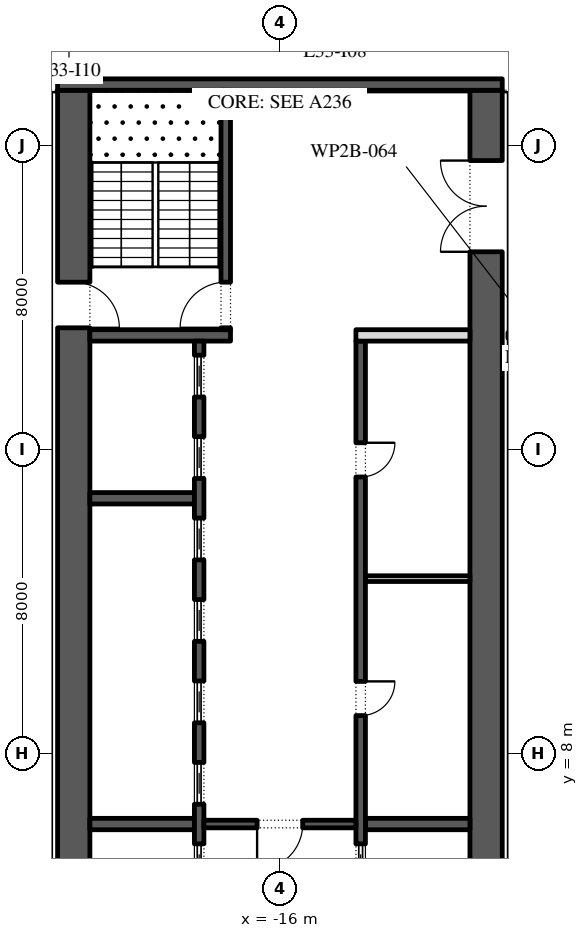
"""IFC4 building model, lengths in metres.
Left out: names, types, materials, properties, quantities, classifications, styles, units other than length and angle.
Written with IfcOpenShell. Run it as: python <this file> out.ifc"""

import sys

from ifc_helpers import new_model, si_unit, direction, frame, frame_2d, origin, place, context, subcontext, project, spatial, rectangle, extrude, element, fill, save


model = new_model("IFC4")
c1 = context("Model", 3, precision=1e-05, world=origin(), true_north=direction((0.0, 1.0)))
c2 = subcontext(c1, "Body", "Model", "MODEL_VIEW")
j1 = project(units=[si_unit("LENGTHUNIT", "METRE"), si_unit("PLANEANGLEUNIT", "RADIAN")], contexts=[c1])
p1 = place(None, origin())
s1 = spatial("IfcSite", under=j1, at=p1, CompositionType="ELEMENT")
p2 = place(p1, origin())
s2 = spatial("IfcBuilding", under=s1, at=p2, CompositionType="ELEMENT")
p3 = place(p2, frame((0.0, 0.0, 151.8)))
s3 = spatial("IfcBuildingStorey", under=s2, at=p3, CompositionType="ELEMENT", Elevation=151.8)
p4 = place(p3, frame((-21.425, -2.45, 0.0), z_axis=(0.0, 0.0, 1.0), x_axis=(0.0, 1.0, 0.0)))
e1 = element("IfcWall", 1, at=p4, inside=s3, PredefinedType="SHEAR", context=c2, shape_type="SweptSolid", body=[
    extrude(rectangle(XDim=27.9, YDim=0.85, at=frame_2d((13.95, 0.0))), origin(), (0.0, 0.0, 1.0), 3.95),
])
p5 = place(p4, frame((5.05, 0.0, 0.0)))
e2 = element("IfcOpeningElement", 2, at=p5, cuts=e1, PredefinedType="OPENING", context=c2, shape_type="SweptSolid", body=[
    extrude(rectangle(XDim=1.2, YDim=2.1, at=frame_2d((0.6, 1.05))), frame((0.0, 0.435, 0.0), z_axis=(0.0, -1.0, 0.0), x_axis=(1.0, 0.0, 0.0)), (0.0, 0.0, 1.0), 0.87),
])
p6 = place(p4, frame((21.65, 0.0, 0.0)))
e3 = element("IfcOpeningElement", 3, at=p6, cuts=e1, PredefinedType="OPENING", context=c2, shape_type="SweptSolid", body=[
    extrude(rectangle(XDim=1.2, YDim=2.1, at=frame_2d((0.6, 1.05))), frame((0.0, 0.435, 0.0), z_axis=(0.0, -1.0, 0.0), x_axis=(1.0, 0.0, 0.0)), (0.0, 0.0, 1.0), 0.87),
])
p7 = place(p3, frame((-10.575, -2.45, 0.0), z_axis=(0.0, 0.0, 1.0), x_axis=(0.0, 1.0, 0.0)))
e4 = element("IfcWall", 4, at=p7, inside=s3, PredefinedType="SHEAR", context=c2, shape_type="SweptSolid", body=[
    extrude(rectangle(XDim=27.9, YDim=0.85, at=frame_2d((13.95, 0.0))), origin(), (0.0, 0.0, 1.0), 3.95),
])
p8 = place(p7, frame((23.65, 0.0, 0.0)))
e5 = element("IfcOpeningElement", 5, at=p8, cuts=e4, PredefinedType="OPENING", context=c2, shape_type="SweptSolid", body=[
    extrude(rectangle(XDim=2.4, YDim=2.1, at=frame_2d((1.2, 1.05))), frame((0.0, 0.435, 0.0), z_axis=(0.0, -1.0, 0.0), x_axis=(1.0, 0.0, 0.0)), (0.0, 0.0, 1.0), 0.87),
])
p9 = place(p7, frame((1.387, 0.0, 0.0)))
e6 = element("IfcOpeningElement", 6, at=p9, cuts=e4, PredefinedType="OPENING", context=c2, shape_type="SweptSolid", body=[
    extrude(rectangle(XDim=0.9, YDim=2.1, at=frame_2d((0.45, 1.05))), frame((0.0, 0.435, 0.0), z_axis=(0.0, -1.0, 0.0), x_axis=(1.0, 0.0, 0.0)), (0.0, 0.0, 1.0), 0.87),
])
p10 = place(p7, frame((4.562, 0.0, 0.0)))
e7 = element("IfcOpeningElement", 7, at=p10, cuts=e4, PredefinedType="OPENING", context=c2, shape_type="SweptSolid", body=[
    extrude(rectangle(XDim=1.0, YDim=2.1, at=frame_2d((0.5, 1.05))), frame((0.0, 0.435, 0.0), z_axis=(0.0, -1.0, 0.0), x_axis=(1.0, 0.0, 0.0)), (0.0, 0.0, 1.0), 0.87),
])
p11 = place(p3, frame((-21.85, 25.6, 0.0), z_axis=(0.0, 0.0, 1.0), x_axis=(1.0, 0.0, 0.0)))
e8 = element("IfcWall", 8, at=p11, inside=s3, PredefinedType="SHEAR", context=c2, shape_type="SweptSolid", body=[
    extrude(rectangle(XDim=11.7, YDim=0.3, at=frame_2d((5.85, 0.0))), origin(), (0.0, 0.0, 1.0), 3.95),
])
p12 = place(p3, frame((-21.0, 19.0, 0.0), z_axis=(0.0, 0.0, 1.0), x_axis=(1.0, 0.0, 0.0)))
e9 = element("IfcWall", 9, at=p12, inside=s3, PredefinedType="SHEAR", context=c2, shape_type="SweptSolid", body=[
    extrude(rectangle(XDim=3.7, YDim=0.3, at=frame_2d((1.85, 0.0))), origin(), (0.0, 0.0, 1.0), 3.95),
])
p13 = place(p3, frame((-17.425, 19.15, 0.0), z_axis=(0.0, 0.0, 1.0), x_axis=(0.0, 1.0, 0.0)))
e10 = element("IfcWall", 10, at=p13, inside=s3, PredefinedType="SHEAR", context=c2, shape_type="SweptSolid", body=[
    extrude(rectangle(XDim=6.3, YDim=0.25, at=frame_2d((3.15, 0.0))), origin(), (0.0, 0.0, 1.0), 3.95),
])
p14 = place(p13, frame((0.05, 0.0, 0.0)))
e11 = element("IfcOpeningElement", 11, at=p14, cuts=e10, PredefinedType="OPENING", context=c2, shape_type="SweptSolid", body=[
    extrude(rectangle(XDim=1.2, YDim=2.1, at=frame_2d((0.6, 1.05))), frame((0.0, 0.135, 0.0), z_axis=(0.0, -1.0, 0.0), x_axis=(1.0, 0.0, 0.0)), (0.0, 0.0, 1.0), 0.27),
])
for number, where, z_axis, x_axis in (
    (12, (-21.0, 6.143, 0.0), (0.0, 0.0, 1.0), (1.0, 0.0, 0.0)),
    (13, (-21.0, 14.714, 0.0), (0.0, 0.0, 1.0), (1.0, 0.0, 0.0)),
):
    element("IfcWall", number, at=place(p3, frame(where, z_axis=z_axis, x_axis=x_axis)), inside=s3, PredefinedType="SHEAR", context=c2, shape_type="SweptSolid", body=[
        extrude(rectangle(XDim=2.75, YDim=0.3, at=frame_2d((1.375, 0.0))), origin(), (0.0, 0.0, 1.0), 3.95),
    ])
p15 = place(p3, frame((-18.125, 4.15, 0.0), z_axis=(0.0, 0.0, 1.0), x_axis=(0.0, 1.0, 0.0)))
e14 = element("IfcWall", 14, at=p15, inside=s3, PredefinedType="SHEAR", context=c2, shape_type="SweptSolid", body=[
    extrude(rectangle(XDim=14.7, YDim=0.25, at=frame_2d((7.35, 0.0))), origin(), (0.0, 0.0, 1.0), 3.95),
])
p16 = place(p15, frame((0.371, 0.0, 0.0)))
e15 = element("IfcOpeningElement", 15, at=p16, cuts=e14, PredefinedType="OPENING", context=c2, shape_type="SweptSolid", body=[
    extrude(rectangle(XDim=1.1, YDim=2.1, at=frame_2d((0.55, 1.05))), frame((0.0, 0.135, 0.0), z_axis=(0.0, -1.0, 0.0), x_axis=(1.0, 0.0, 0.0)), (0.0, 0.0, 1.0), 0.27),
])
p17 = place(p15, frame((2.514, 0.0, 0.0)))
e16 = element("IfcOpeningElement", 16, at=p17, cuts=e14, PredefinedType="OPENING", context=c2, shape_type="SweptSolid", body=[
    extrude(rectangle(XDim=1.1, YDim=2.1, at=frame_2d((0.55, 1.05))), frame((0.0, 0.135, 0.0), z_axis=(0.0, -1.0, 0.0), x_axis=(1.0, 0.0, 0.0)), (0.0, 0.0, 1.0), 0.27),
])
p18 = place(p15, frame((4.657, 0.0, 0.0)))
e17 = element("IfcOpeningElement", 17, at=p18, cuts=e14, PredefinedType="OPENING", context=c2, shape_type="SweptSolid", body=[
    extrude(rectangle(XDim=1.1, YDim=2.1, at=frame_2d((0.55, 1.05))), frame((0.0, 0.135, 0.0), z_axis=(0.0, -1.0, 0.0), x_axis=(1.0, 0.0, 0.0)), (0.0, 0.0, 1.0), 0.27),
])
p19 = place(p15, frame((6.8, 0.0, 0.0)))
e18 = element("IfcOpeningElement", 18, at=p19, cuts=e14, PredefinedType="OPENING", context=c2, shape_type="SweptSolid", body=[
    extrude(rectangle(XDim=1.1, YDim=2.1, at=frame_2d((0.55, 1.05))), frame((0.0, 0.135, 0.0), z_axis=(0.0, -1.0, 0.0), x_axis=(1.0, 0.0, 0.0)), (0.0, 0.0, 1.0), 0.27),
])
p20 = place(p15, frame((8.943, 0.0, 0.0)))
e19 = element("IfcOpeningElement", 19, at=p20, cuts=e14, PredefinedType="OPENING", context=c2, shape_type="SweptSolid", body=[
    extrude(rectangle(XDim=1.1, YDim=2.1, at=frame_2d((0.55, 1.05))), frame((0.0, 0.135, 0.0), z_axis=(0.0, -1.0, 0.0), x_axis=(1.0, 0.0, 0.0)), (0.0, 0.0, 1.0), 0.27),
])
p21 = place(p15, frame((11.086, 0.0, 0.0)))
e20 = element("IfcOpeningElement", 20, at=p21, cuts=e14, PredefinedType="OPENING", context=c2, shape_type="SweptSolid", body=[
    extrude(rectangle(XDim=1.1, YDim=2.1, at=frame_2d((0.55, 1.05))), frame((0.0, 0.135, 0.0), z_axis=(0.0, -1.0, 0.0), x_axis=(1.0, 0.0, 0.0)), (0.0, 0.0, 1.0), 0.27),
])
p22 = place(p15, frame((13.229, 0.0, 0.0)))
e21 = element("IfcOpeningElement", 21, at=p22, cuts=e14, PredefinedType="OPENING", context=c2, shape_type="SweptSolid", body=[
    extrude(rectangle(XDim=1.1, YDim=2.1, at=frame_2d((0.55, 1.05))), frame((0.0, 0.135, 0.0), z_axis=(0.0, -1.0, 0.0), x_axis=(1.0, 0.0, 0.0)), (0.0, 0.0, 1.0), 0.27),
])
p23 = place(p3, frame((-13.75, 6.143, 0.0), z_axis=(0.0, 0.0, 1.0), x_axis=(1.0, 0.0, 0.0)))
e22 = element("IfcWall", 22, at=p23, inside=s3, PredefinedType="SHEAR", context=c2, shape_type="SweptSolid", body=[
    extrude(rectangle(XDim=2.75, YDim=0.3, at=frame_2d((1.375, 0.0))), origin(), (0.0, 0.0, 1.0), 3.95),
])
p24 = place(p3, frame((-13.875, -2.45, 0.0), z_axis=(0.0, 0.0, 1.0), x_axis=(0.0, 1.0, 0.0)))
e23 = element("IfcWall", 23, at=p24, inside=s3, PredefinedType="SHEAR", context=c2, shape_type="SweptSolid", body=[
    extrude(rectangle(XDim=21.3, YDim=0.25, at=frame_2d((10.65, 0.0))), origin(), (0.0, 0.0, 1.0), 3.95),
])
p25 = place(p24, frame((11.446, 0.0, 0.0)))
e24 = element("IfcOpeningElement", 24, at=p25, cuts=e23, PredefinedType="OPENING", context=c2, shape_type="SweptSolid", body=[
    extrude(rectangle(XDim=0.9, YDim=2.1, at=frame_2d((0.45, 1.05))), frame((0.0, 0.135, 0.0), z_axis=(0.0, -1.0, 0.0), x_axis=(1.0, 0.0, 0.0)), (0.0, 0.0, 1.0), 0.27),
])
p26 = place(p24, frame((17.725, 0.0, 0.0)))
e25 = element("IfcOpeningElement", 25, at=p26, cuts=e23, PredefinedType="OPENING", context=c2, shape_type="SweptSolid", body=[
    extrude(rectangle(XDim=0.9, YDim=2.1, at=frame_2d((0.45, 1.05))), frame((0.0, 0.135, 0.0), z_axis=(0.0, -1.0, 0.0), x_axis=(1.0, 0.0, 0.0)), (0.0, 0.0, 1.0), 0.27),
])
p27 = place(p24, frame((6.971, 0.0, 0.0)))
e26 = element("IfcOpeningElement", 26, at=p27, cuts=e23, PredefinedType="OPENING", context=c2, shape_type="SweptSolid", body=[
    extrude(rectangle(XDim=1.1, YDim=2.1, at=frame_2d((0.55, 1.05))), frame((0.0, 0.135, 0.0), z_axis=(0.0, -1.0, 0.0), x_axis=(1.0, 0.0, 0.0)), (0.0, 0.0, 1.0), 0.27),
])
p28 = place(p3, frame((-14.0, 19.0, 0.0), z_axis=(0.0, 0.0, 1.0), x_axis=(1.0, 0.0, 0.0)))
e27 = element("IfcWall", 27, at=p28, inside=s3, PredefinedType="PARTITIONING", context=c2, shape_type="SweptSolid", body=[
    extrude(rectangle(XDim=3.0, YDim=0.3, at=frame_2d((1.5, 0.0))), origin(), (0.0, 0.0, 1.0), 3.95),
])
p29 = place(p3, frame((-13.75, 12.6, 0.0), z_axis=(0.0, 0.0, 1.0), x_axis=(1.0, 0.0, 0.0)))
e28 = element("IfcWall", 28, at=p29, inside=s3, PredefinedType="PARTITIONING", context=c2, shape_type="SweptSolid", body=[
    extrude(rectangle(XDim=2.75, YDim=0.15, at=frame_2d((1.375, 0.0))), origin(), (0.0, 0.0, 1.0), 3.95),
])
p30 = place(p3, frame((-18.0, 6.143, 0.0), z_axis=(0.0, 0.0, 1.0), x_axis=(1.0, 0.0, 0.0)))
e29 = element("IfcWall", 29, at=p30, inside=s3, PredefinedType="SHEAR", context=c2, shape_type="SweptSolid", body=[
    extrude(rectangle(XDim=4.0, YDim=0.2, at=frame_2d((2.0, 0.0))), origin(), (0.0, 0.0, 1.0), 3.95),
])
p31 = place(p30, frame((1.4, 0.0, 0.0)))
e30 = element("IfcOpeningElement", 30, at=p31, cuts=e29, PredefinedType="OPENING", context=c2, shape_type="SweptSolid", body=[
    extrude(rectangle(XDim=1.2, YDim=2.1, at=frame_2d((0.6, 1.05))), frame((0.0, 0.11, 0.0), z_axis=(0.0, -1.0, 0.0), x_axis=(1.0, 0.0, 0.0)), (0.0, 0.0, 1.0), 0.22),
])
p32 = place(p3, frame((-10.0, 19.0, 0.0), z_axis=(0.0, 0.0, 1.0), x_axis=(1.0, 0.0, 0.0)))
e31 = element("IfcWall", 31, at=p32, inside=s3, PredefinedType="PARTITIONING", context=c2, shape_type="SweptSolid", body=[
    extrude(rectangle(XDim=1.515, YDim=0.15, at=frame_2d((0.757, 0.0))), origin(), (0.0, 0.0, 1.0), 3.95),
])
p33 = place(p32, frame((0.258, 0.0, 0.0)))
e32 = element("IfcOpeningElement", 32, at=p33, cuts=e31, PredefinedType="OPENING", context=c2, shape_type="SweptSolid", body=[
    extrude(rectangle(XDim=1.0, YDim=2.1, at=frame_2d((0.5, 1.05))), frame((0.0, 0.085, 0.0), z_axis=(0.0, -1.0, 0.0), x_axis=(1.0, 0.0, 0.0)), (0.0, 0.0, 1.0), 0.17),
])
p34 = place(p16, origin())
e33 = element("IfcDoor", 33, at=p34, inside=s3, OperationType="SLIDING_TO_LEFT", PredefinedType="DOOR", context=c2, shape_type="SweptSolid", body=[
    extrude(rectangle(XDim=1.1, YDim=2.1, at=frame_2d((0.55, 1.05))), frame((0.0, 0.025, 0.0), z_axis=(0.0, -1.0, 0.0), x_axis=(1.0, 0.0, 0.0)), (0.0, 0.0, 1.0), 0.05),
])
fill(e15, e33)
p35 = place(p17, origin())
e34 = element("IfcDoor", 34, at=p35, inside=s3, OperationType="SLIDING_TO_LEFT", PredefinedType="DOOR", context=c2, shape_type="SweptSolid", body=[
    extrude(rectangle(XDim=1.1, YDim=2.1, at=frame_2d((0.55, 1.05))), frame((0.0, 0.025, 0.0), z_axis=(0.0, -1.0, 0.0), x_axis=(1.0, 0.0, 0.0)), (0.0, 0.0, 1.0), 0.05),
])
fill(e16, e34)
p36 = place(p18, origin())
e35 = element("IfcDoor", 35, at=p36, inside=s3, OperationType="SLIDING_TO_LEFT", PredefinedType="DOOR", context=c2, shape_type="SweptSolid", body=[
    extrude(rectangle(XDim=1.1, YDim=2.1, at=frame_2d((0.55, 1.05))), frame((0.0, 0.025, 0.0), z_axis=(0.0, -1.0, 0.0), x_axis=(1.0, 0.0, 0.0)), (0.0, 0.0, 1.0), 0.05),
])
fill(e17, e35)
p37 = place(p19, origin())
e36 = element("IfcDoor", 36, at=p37, inside=s3, OperationType="SLIDING_TO_LEFT", PredefinedType="DOOR", context=c2, shape_type="SweptSolid", body=[
    extrude(rectangle(XDim=1.1, YDim=2.1, at=frame_2d((0.55, 1.05))), frame((0.0, 0.025, 0.0), z_axis=(0.0, -1.0, 0.0), x_axis=(1.0, 0.0, 0.0)), (0.0, 0.0, 1.0), 0.05),
])
fill(e18, e36)
p38 = place(p20, origin())
e37 = element("IfcDoor", 37, at=p38, inside=s3, OperationType="SLIDING_TO_LEFT", PredefinedType="DOOR", context=c2, shape_type="SweptSolid", body=[
    extrude(rectangle(XDim=1.1, YDim=2.1, at=frame_2d((0.55, 1.05))), frame((0.0, 0.025, 0.0), z_axis=(0.0, -1.0, 0.0), x_axis=(1.0, 0.0, 0.0)), (0.0, 0.0, 1.0), 0.05),
])
fill(e19, e37)
p39 = place(p21, origin())
e38 = element("IfcDoor", 38, at=p39, inside=s3, OperationType="SLIDING_TO_LEFT", PredefinedType="DOOR", context=c2, shape_type="SweptSolid", body=[
    extrude(rectangle(XDim=1.1, YDim=2.1, at=frame_2d((0.55, 1.05))), frame((0.0, 0.025, 0.0), z_axis=(0.0, -1.0, 0.0), x_axis=(1.0, 0.0, 0.0)), (0.0, 0.0, 1.0), 0.05),
])
fill(e20, e38)
p40 = place(p22, origin())
e39 = element("IfcDoor", 39, at=p40, inside=s3, OperationType="SLIDING_TO_LEFT", PredefinedType="DOOR", context=c2, shape_type="SweptSolid", body=[
    extrude(rectangle(XDim=1.1, YDim=2.1, at=frame_2d((0.55, 1.05))), frame((0.0, 0.025, 0.0), z_axis=(0.0, -1.0, 0.0), x_axis=(1.0, 0.0, 0.0)), (0.0, 0.0, 1.0), 0.05),
])
fill(e21, e39)
p41 = place(p25, frame((0.9, -0.2, 0.0), z_axis=(0.0, 0.0, 1.0), x_axis=(-1.0, 0.0, 0.0)))
e40 = element("IfcDoor", 40, at=p41, inside=s3, OperationType="SINGLE_SWING_RIGHT", PredefinedType="DOOR", context=c2, shape_type="SweptSolid", body=[
    extrude(rectangle(XDim=0.9, YDim=2.1, at=frame_2d((0.45, 1.05))), frame((0.0, -0.075, 0.0), z_axis=(0.0, -1.0, 0.0), x_axis=(1.0, 0.0, 0.0)), (0.0, 0.0, 1.0), 0.05),
])
fill(e24, e40)
p42 = place(p26, frame((0.9, -0.2, 0.0), z_axis=(0.0, 0.0, 1.0), x_axis=(-1.0, 0.0, 0.0)))
e41 = element("IfcDoor", 41, at=p42, inside=s3, OperationType="SINGLE_SWING_RIGHT", PredefinedType="DOOR", context=c2, shape_type="SweptSolid", body=[
    extrude(rectangle(XDim=0.9, YDim=2.1, at=frame_2d((0.45, 1.05))), frame((0.0, -0.075, 0.0), z_axis=(0.0, -1.0, 0.0), x_axis=(1.0, 0.0, 0.0)), (0.0, 0.0, 1.0), 0.05),
])
fill(e25, e41)
p43 = place(p27, origin())
e42 = element("IfcDoor", 42, at=p43, inside=s3, OperationType="SLIDING_TO_LEFT", PredefinedType="DOOR", context=c2, shape_type="SweptSolid", body=[
    extrude(rectangle(XDim=1.1, YDim=2.1, at=frame_2d((0.55, 1.05))), frame((0.0, 0.025, 0.0), z_axis=(0.0, -1.0, 0.0), x_axis=(1.0, 0.0, 0.0)), (0.0, 0.0, 1.0), 0.05),
])
fill(e26, e42)
p44 = place(p31, frame((1.2, 0.0, 0.0), z_axis=(0.0, 0.0, 1.0), x_axis=(-1.0, 0.0, 0.0)))
e43 = element("IfcDoor", 43, at=p44, inside=s3, OperationType="SINGLE_SWING_LEFT", PredefinedType="DOOR", context=c2, shape_type="SweptSolid", body=[
    extrude(rectangle(XDim=1.2, YDim=2.1, at=frame_2d((0.6, 1.05))), frame((0.0, 0.025, 0.0), z_axis=(0.0, -1.0, 0.0), x_axis=(1.0, 0.0, 0.0)), (0.0, 0.0, 1.0), 0.05),
])
fill(e30, e43)
p45 = place(p8, origin())
e44 = element("IfcDoor", 44, at=p45, inside=s3, OperationType="DOUBLE_DOOR_SINGLE_SWING", PredefinedType="DOOR", context=c2, shape_type="SweptSolid", body=[
    extrude(rectangle(XDim=2.4, YDim=2.1, at=frame_2d((1.2, 1.05))), frame((0.0, 0.025, 0.0), z_axis=(0.0, -1.0, 0.0), x_axis=(1.0, 0.0, 0.0)), (0.0, 0.0, 1.0), 0.05),
])
fill(e5, e44)
p46 = place(p14, origin())
e45 = element("IfcDoor", 45, at=p46, inside=s3, OperationType="SINGLE_SWING_RIGHT", PredefinedType="DOOR", context=c2, shape_type="SweptSolid", body=[
    extrude(rectangle(XDim=1.2, YDim=2.1, at=frame_2d((0.6, 1.05))), frame((0.0, 0.025, 0.0), z_axis=(0.0, -1.0, 0.0), x_axis=(1.0, 0.0, 0.0)), (0.0, 0.0, 1.0), 0.05),
])
fill(e11, e45)
p47 = place(p6, frame((1.2, 0.0, 0.0), z_axis=(0.0, 0.0, 1.0), x_axis=(-1.0, 0.0, 0.0)))
e46 = element("IfcDoor", 46, at=p47, inside=s3, OperationType="SINGLE_SWING_LEFT", PredefinedType="DOOR", context=c2, shape_type="SweptSolid", body=[
    extrude(rectangle(XDim=1.2, YDim=2.1, at=frame_2d((0.6, 1.05))), frame((0.0, 0.025, 0.0), z_axis=(0.0, -1.0, 0.0), x_axis=(1.0, 0.0, 0.0)), (0.0, 0.0, 1.0), 0.05),
])
fill(e3, e46)
save(model, sys.argv[1])
